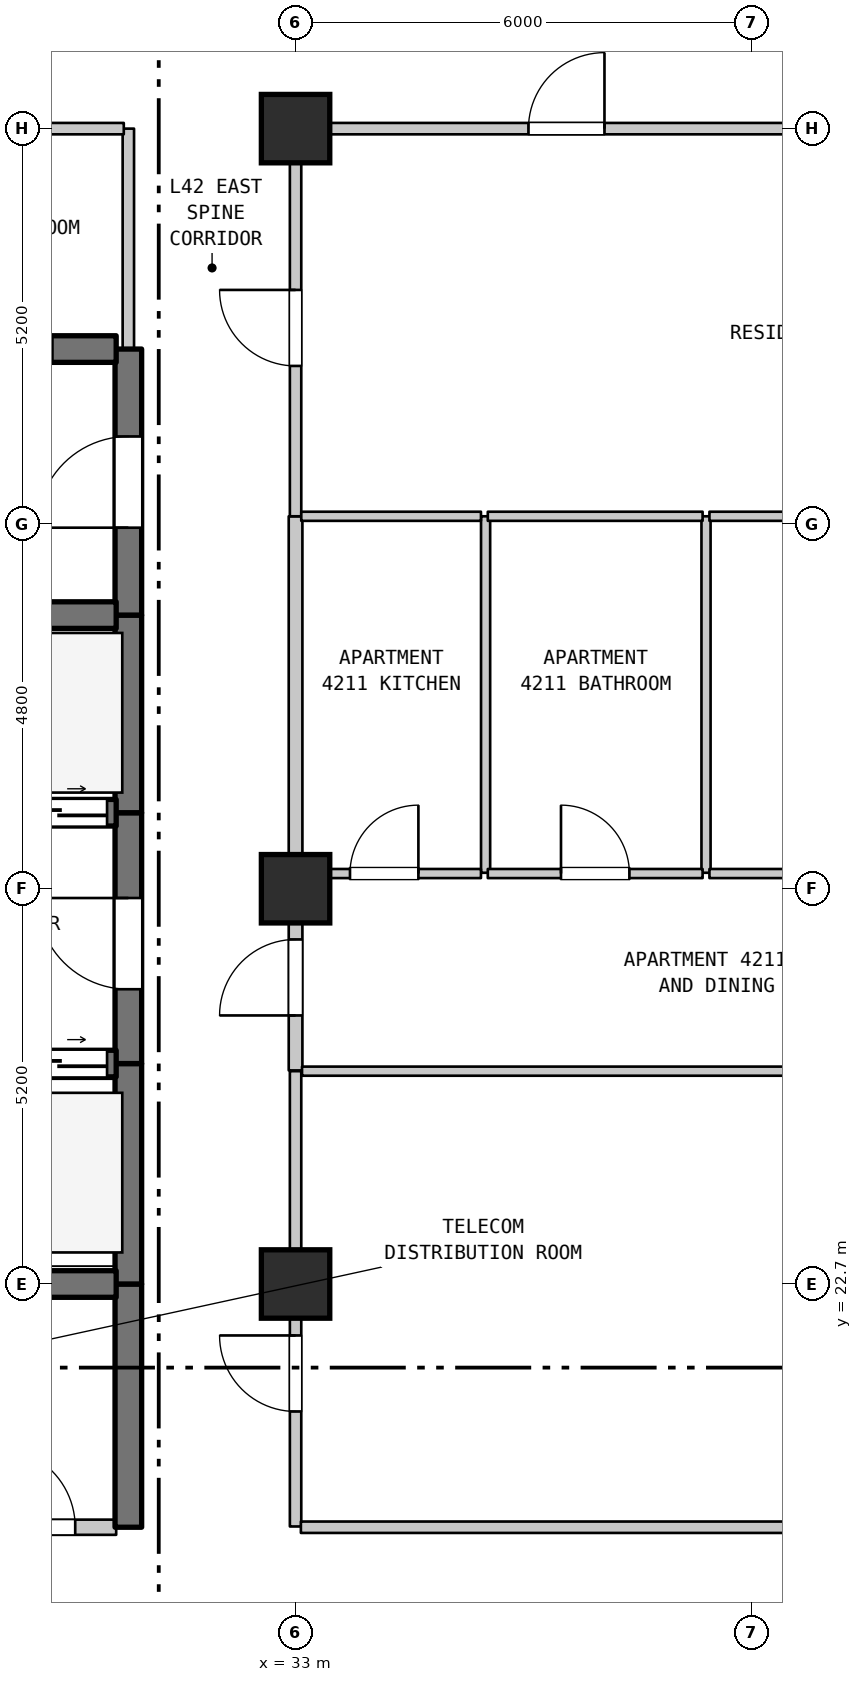
"""IFC4 building model, lengths in metres.
Left out: names, types, materials, properties, quantities, classifications, styles, units other than length and angle.
Written with IfcOpenShell. Run it as: python <this file> out.ifc"""

import sys

from ifc_helpers import new_model, si_unit, direction, frame, frame_2d, origin, origin_2d, place, context, subcontext, project, spatial, rectangle, extrude, element, fill, save


model = new_model("IFC4")
c1 = context("Model", 3, precision=1e-05, world=origin(), true_north=direction((0.0, 1.0)))
c2 = subcontext(c1, "Body", "Model", "MODEL_VIEW")
j1 = project(units=[si_unit("LENGTHUNIT", "METRE"), si_unit("PLANEANGLEUNIT", "RADIAN")], contexts=[c1])
p1 = place(None, origin())
s1 = spatial("IfcSite", under=j1, at=p1, CompositionType="ELEMENT")
p2 = place(p1, origin())
s2 = spatial("IfcBuilding", under=s1, at=p2, CompositionType="ELEMENT")
p3 = place(p2, frame((0.0, 0.0, 172.8)))
s3 = spatial("IfcBuildingStorey", under=s2, at=p3, CompositionType="ELEMENT", Elevation=172.8)
for number, where, z_axis, x_axis in (
    (1, (33.0, 22.7, 0.0), (0.0, 0.0, 1.0), (1.0, 0.0, 0.0)),
    (2, (33.0, 27.9, 0.0), (0.0, 0.0, 1.0), (1.0, 0.0, 0.0)),
    (3, (33.0, 37.9, 0.0), (0.0, 0.0, 1.0), (1.0, 0.0, 0.0)),
):
    element("IfcColumn", number, at=place(p3, frame(where, z_axis=z_axis, x_axis=x_axis)), inside=s3, PredefinedType="COLUMN", context=c2, shape_type="SweptSolid", body=[
        extrude(rectangle(XDim=0.9, YDim=0.9, at=origin_2d()), origin(), (0.0, 0.0, 1.0), 3.7),
    ])
p4 = place(p3, frame((30.8, 19.5, 0.0), z_axis=(0.0, 0.0, 1.0), x_axis=(0.0, 1.0, 0.0)))
e4 = element("IfcWall", 4, at=p4, inside=s3, PredefinedType="SHEAR", context=c2, shape_type="SweptSolid", body=[
    extrude(rectangle(XDim=3.2, YDim=0.35, at=frame_2d((1.6, 0.0))), origin(), (0.0, 0.0, 1.0), 3.39),
])
p5 = place(p3, frame((30.8, 22.7, 0.0), z_axis=(0.0, 0.0, 1.0), x_axis=(0.0, 1.0, 0.0)))
e5 = element("IfcWall", 5, at=p5, inside=s3, PredefinedType="SHEAR", context=c2, shape_type="SweptSolid", body=[
    extrude(rectangle(XDim=2.9, YDim=0.35, at=frame_2d((1.45, 0.0))), origin(), (0.0, 0.0, 1.0), 3.39),
])
p6 = place(p3, frame((30.8, 25.6, 0.0), z_axis=(0.0, 0.0, 1.0), x_axis=(0.0, 1.0, 0.0)))
e6 = element("IfcWall", 6, at=p6, inside=s3, PredefinedType="SHEAR", context=c2, shape_type="SweptSolid", body=[
    extrude(rectangle(XDim=3.3, YDim=0.35, at=frame_2d((1.65, 0.0))), origin(), (0.0, 0.0, 1.0), 3.39),
])
p7 = place(p6, frame((0.978, 0.0, 0.0)))
e7 = element("IfcOpeningElement", 7, at=p7, cuts=e6, PredefinedType="OPENING", context=c2, shape_type="SweptSolid", body=[
    extrude(rectangle(XDim=1.2, YDim=2.2, at=frame_2d((0.6, 1.1))), frame((0.0, 0.185, 0.0), z_axis=(0.0, -1.0, 0.0), x_axis=(1.0, 0.0, 0.0)), (0.0, 0.0, 1.0), 0.37),
])
p8 = place(p3, frame((30.8, 28.9, 0.0), z_axis=(0.0, 0.0, 1.0), x_axis=(0.0, 1.0, 0.0)))
e8 = element("IfcWall", 8, at=p8, inside=s3, PredefinedType="SHEAR", context=c2, shape_type="SweptSolid", body=[
    extrude(rectangle(XDim=2.6, YDim=0.35, at=frame_2d((1.3, 0.0))), origin(), (0.0, 0.0, 1.0), 3.39),
])
p9 = place(p3, frame((30.8, 31.5, 0.0), z_axis=(0.0, 0.0, 1.0), x_axis=(0.0, 1.0, 0.0)))
e9 = element("IfcWall", 9, at=p9, inside=s3, PredefinedType="SHEAR", context=c2, shape_type="SweptSolid", body=[
    extrude(rectangle(XDim=3.5, YDim=0.35, at=frame_2d((1.75, 0.0))), origin(), (0.0, 0.0, 1.0), 3.39),
])
p10 = place(p9, frame((1.15, 0.0, 0.0)))
e10 = element("IfcOpeningElement", 10, at=p10, cuts=e9, PredefinedType="OPENING", context=c2, shape_type="SweptSolid", body=[
    extrude(rectangle(XDim=1.2, YDim=2.2, at=frame_2d((0.6, 1.1))), frame((0.0, 0.185, 0.0), z_axis=(0.0, -1.0, 0.0), x_axis=(1.0, 0.0, 0.0)), (0.0, 0.0, 1.0), 0.37),
])
p11 = place(p3, frame((30.8, 35.0, 0.0), z_axis=(0.0, 0.0, 1.0), x_axis=(0.0, 1.0, 0.0)))
e11 = element("IfcWall", 11, at=p11, inside=s3, PredefinedType="STANDARD", context=c2, shape_type="SweptSolid", body=[
    extrude(rectangle(XDim=2.9, YDim=0.15, at=frame_2d((1.45, 0.0))), origin(), (0.0, 0.0, 1.0), 3.39),
])
p12 = place(p3, frame((33.0, 19.51, 0.0), z_axis=(0.0, 0.0, 1.0), x_axis=(0.0, 1.0, 0.0)))
e12 = element("IfcWall", 12, at=p12, inside=s3, PredefinedType="STANDARD", context=c2, shape_type="SweptSolid", body=[
    extrude(rectangle(XDim=5.99, YDim=0.15, at=frame_2d((2.995, 0.0))), origin(), (0.0, 0.0, 1.0), 2.99),
])
p13 = place(p12, frame((1.513, 0.0, 0.0)))
e13 = element("IfcOpeningElement", 13, at=p13, cuts=e12, PredefinedType="OPENING", context=c2, shape_type="SweptSolid", body=[
    extrude(rectangle(XDim=1.0, YDim=2.15, at=frame_2d((0.5, 1.075))), frame((0.0, 0.085, 0.0), z_axis=(0.0, -1.0, 0.0), x_axis=(1.0, 0.0, 0.0)), (0.0, 0.0, 1.0), 0.17),
])
p14 = place(p3, frame((33.0, 25.51, 0.0), z_axis=(0.0, 0.0, 1.0), x_axis=(0.0, 1.0, 0.0)))
e14 = element("IfcWall", 14, at=p14, inside=s3, PredefinedType="STANDARD", context=c2, shape_type="SweptSolid", body=[
    extrude(rectangle(XDim=2.6, YDim=0.18, at=frame_2d((1.3, 0.0))), origin(), (0.0, 0.0, 1.0), 2.99),
])
p15 = place(p14, frame((0.723, 0.0, 0.0)))
e15 = element("IfcOpeningElement", 15, at=p15, cuts=e14, PredefinedType="OPENING", context=c2, shape_type="SweptSolid", body=[
    extrude(rectangle(XDim=1.0, YDim=2.15, at=frame_2d((0.5, 1.075))), frame((0.0, 0.1, 0.0), z_axis=(0.0, -1.0, 0.0), x_axis=(1.0, 0.0, 0.0)), (0.0, 0.0, 1.0), 0.2),
])
p16 = place(p3, frame((33.0, 28.11, 0.0), z_axis=(0.0, 0.0, 1.0), x_axis=(0.0, 1.0, 0.0)))
e16 = element("IfcWall", 16, at=p16, inside=s3, PredefinedType="STANDARD", context=c2, shape_type="SweptSolid", body=[
    extrude(rectangle(XDim=4.69, YDim=0.18, at=frame_2d((2.345, 0.0))), origin(), (0.0, 0.0, 1.0), 2.89),
])
p17 = place(p3, frame((33.0, 32.8, 0.0), z_axis=(0.0, 0.0, 1.0), x_axis=(0.0, 1.0, 0.0)))
e17 = element("IfcWall", 17, at=p17, inside=s3, PredefinedType="STANDARD", context=c2, shape_type="SweptSolid", body=[
    extrude(rectangle(XDim=5.1, YDim=0.15, at=frame_2d((2.55, 0.0))), origin(), (0.0, 0.0, 1.0), 2.89),
])
p18 = place(p17, frame((1.978, 0.0, 0.0)))
e18 = element("IfcOpeningElement", 18, at=p18, cuts=e17, PredefinedType="OPENING", context=c2, shape_type="SweptSolid", body=[
    extrude(rectangle(XDim=1.0, YDim=2.15, at=frame_2d((0.5, 1.075))), frame((0.0, 0.085, 0.0), z_axis=(0.0, -1.0, 0.0), x_axis=(1.0, 0.0, 0.0)), (0.0, 0.0, 1.0), 0.17),
])
for number, where, z_axis, x_axis in (
    (19, (35.5, 28.11, 0.0), (0.0, 0.0, 1.0), (0.0, 1.0, 0.0)),
    (20, (38.4, 28.11, 0.0), (0.0, 0.0, 1.0), (0.0, 1.0, 0.0)),
):
    element("IfcWall", number, at=place(p3, frame(where, z_axis=z_axis, x_axis=x_axis)), inside=s3, PredefinedType="PARTITIONING", context=c2, shape_type="SweptSolid", body=[
        extrude(rectangle(XDim=4.69, YDim=0.12, at=frame_2d((2.345, 0.0))), origin(), (0.0, 0.0, 1.0), 3.39),
    ])
p19 = place(p3, frame((28.585, 19.5, 0.0), z_axis=(0.0, 0.0, 1.0), x_axis=(1.0, 0.0, 0.0)))
e21 = element("IfcWall", 21, at=p19, inside=s3, PredefinedType="STANDARD", context=c2, shape_type="SweptSolid", body=[
    extrude(rectangle(XDim=2.055, YDim=0.2, at=frame_2d((1.027, 0.0))), origin(), (0.0, 0.0, 1.0), 3.39),
])
p20 = place(p19, frame((0.466, 0.0, 0.0)))
e22 = element("IfcOpeningElement", 22, at=p20, cuts=e21, PredefinedType="OPENING", context=c2, shape_type="SweptSolid", body=[
    extrude(rectangle(XDim=1.05, YDim=2.15, at=frame_2d((0.525, 1.075))), frame((0.0, 0.11, 0.0), z_axis=(0.0, -1.0, 0.0), x_axis=(1.0, 0.0, 0.0)), (0.0, 0.0, 1.0), 0.22),
])
p21 = place(p3, frame((33.07, 19.5, 0.0), z_axis=(0.0, 0.0, 1.0), x_axis=(1.0, 0.0, 0.0)))
e23 = element("IfcWall", 23, at=p21, inside=s3, PredefinedType="STANDARD", context=c2, shape_type="SweptSolid", body=[
    extrude(rectangle(XDim=21.51, YDim=0.15, at=frame_2d((10.755, 0.0))), origin(), (0.0, 0.0, 1.0), 3.39),
])
p22 = place(p21, frame((10.185, 0.0, 0.0)))
e24 = element("IfcOpeningElement", 24, at=p22, cuts=e23, PredefinedType="OPENING", context=c2, shape_type="SweptSolid", body=[
    extrude(rectangle(XDim=1.0, YDim=2.15, at=frame_2d((0.5, 1.075))), frame((0.0, 0.085, 0.0), z_axis=(0.0, -1.0, 0.0), x_axis=(1.0, 0.0, 0.0)), (0.0, 0.0, 1.0), 0.17),
])
p23 = place(p3, frame((28.585, 22.7, 0.0), z_axis=(0.0, 0.0, 1.0), x_axis=(1.0, 0.0, 0.0)))
e25 = element("IfcWall", 25, at=p23, inside=s3, PredefinedType="SHEAR", context=c2, shape_type="SweptSolid", body=[
    extrude(rectangle(XDim=2.055, YDim=0.35, at=frame_2d((1.027, 0.0))), origin(), (0.0, 0.0, 1.0), 3.39),
])
p24 = place(p3, frame((33.085, 25.5, 0.0), z_axis=(0.0, 0.0, 1.0), x_axis=(1.0, 0.0, 0.0)))
e26 = element("IfcWall", 26, at=p24, inside=s3, PredefinedType="PARTITIONING", context=c2, shape_type="SweptSolid", body=[
    extrude(rectangle(XDim=23.905, YDim=0.12, at=frame_2d((11.953, 0.0))), origin(), (0.0, 0.0, 1.0), 3.39),
])
p25 = place(p3, frame((27.46, 25.6, 0.0), z_axis=(0.0, 0.0, 1.0), x_axis=(1.0, 0.0, 0.0)))
e27 = element("IfcWall", 27, at=p25, inside=s3, PredefinedType="SHEAR", context=c2, shape_type="SweptSolid", body=[
    extrude(rectangle(XDim=3.18, YDim=0.35, at=frame_2d((1.59, 0.0))), origin(), (0.0, 0.0, 1.0), 3.39),
])
p26 = place(p25, frame((0.12, 0.0, 0.0)))
e28 = element("IfcOpeningElement", 28, at=p26, cuts=e27, PredefinedType="OPENING", context=c2, shape_type="SweptSolid", body=[
    extrude(rectangle(XDim=1.25, YDim=2.2, at=frame_2d((0.625, 1.1))), frame((0.0, 0.185, 0.0), z_axis=(0.0, -1.0, 0.0), x_axis=(1.0, 0.0, 0.0)), (0.0, 0.0, 1.0), 0.37),
])
p27 = place(p25, frame((1.81, 0.0, 0.0)))
e29 = element("IfcOpeningElement", 29, at=p27, cuts=e27, PredefinedType="OPENING", context=c2, shape_type="SweptSolid", body=[
    extrude(rectangle(XDim=1.25, YDim=2.2, at=frame_2d((0.625, 1.1))), frame((0.0, 0.185, 0.0), z_axis=(0.0, -1.0, 0.0), x_axis=(1.0, 0.0, 0.0)), (0.0, 0.0, 1.0), 0.37),
])
p28 = place(p3, frame((33.075, 28.1, 0.0), z_axis=(0.0, 0.0, 1.0), x_axis=(1.0, 0.0, 0.0)))
e30 = element("IfcWall", 30, at=p28, inside=s3, PredefinedType="PARTITIONING", context=c2, shape_type="SweptSolid", body=[
    extrude(rectangle(XDim=2.364, YDim=0.12, at=frame_2d((1.182, 0.0))), origin(), (0.0, 0.0, 1.0), 3.39),
])
p29 = place(p28, frame((0.641, 0.0, 0.0)))
e31 = element("IfcOpeningElement", 31, at=p29, cuts=e30, PredefinedType="OPENING", context=c2, shape_type="SweptSolid", body=[
    extrude(rectangle(XDim=0.9, YDim=2.15, at=frame_2d((0.45, 1.075))), frame((0.0, 0.07, 0.0), z_axis=(0.0, -1.0, 0.0), x_axis=(1.0, 0.0, 0.0)), (0.0, 0.0, 1.0), 0.14),
])
p30 = place(p3, frame((35.529, 28.1, 0.0), z_axis=(0.0, 0.0, 1.0), x_axis=(1.0, 0.0, 0.0)))
e32 = element("IfcWall", 32, at=p30, inside=s3, PredefinedType="PARTITIONING", context=c2, shape_type="SweptSolid", body=[
    extrude(rectangle(XDim=2.826, YDim=0.12, at=frame_2d((1.413, 0.0))), origin(), (0.0, 0.0, 1.0), 3.39),
])
p31 = place(p30, frame((0.963, 0.0, 0.0)))
e33 = element("IfcOpeningElement", 33, at=p31, cuts=e32, PredefinedType="OPENING", context=c2, shape_type="SweptSolid", body=[
    extrude(rectangle(XDim=0.9, YDim=2.1, at=frame_2d((0.45, 1.05))), frame((0.0, 0.07, 0.0), z_axis=(0.0, -1.0, 0.0), x_axis=(1.0, 0.0, 0.0)), (0.0, 0.0, 1.0), 0.14),
])
p32 = place(p3, frame((38.445, 28.1, 0.0), z_axis=(0.0, 0.0, 1.0), x_axis=(1.0, 0.0, 0.0)))
e34 = element("IfcWall", 34, at=p32, inside=s3, PredefinedType="PARTITIONING", context=c2, shape_type="SweptSolid", body=[
    extrude(rectangle(XDim=6.499, YDim=0.12, at=frame_2d((3.25, 0.0))), origin(), (0.0, 0.0, 1.0), 3.39),
])
p33 = place(p32, frame((2.774, 0.0, 0.0)))
e35 = element("IfcOpeningElement", 35, at=p33, cuts=e34, PredefinedType="OPENING", context=c2, shape_type="SweptSolid", body=[
    extrude(rectangle(XDim=0.9, YDim=2.15, at=frame_2d((0.45, 1.075))), frame((0.0, 0.07, 0.0), z_axis=(0.0, -1.0, 0.0), x_axis=(1.0, 0.0, 0.0)), (0.0, 0.0, 1.0), 0.14),
])
p34 = place(p3, frame((27.46, 28.9, 0.0), z_axis=(0.0, 0.0, 1.0), x_axis=(1.0, 0.0, 0.0)))
e36 = element("IfcWall", 36, at=p34, inside=s3, PredefinedType="SHEAR", context=c2, shape_type="SweptSolid", body=[
    extrude(rectangle(XDim=3.18, YDim=0.35, at=frame_2d((1.59, 0.0))), origin(), (0.0, 0.0, 1.0), 3.39),
])
p35 = place(p34, frame((0.12, 0.0, 0.0)))
e37 = element("IfcOpeningElement", 37, at=p35, cuts=e36, PredefinedType="OPENING", context=c2, shape_type="SweptSolid", body=[
    extrude(rectangle(XDim=1.25, YDim=2.2, at=frame_2d((0.625, 1.1))), frame((0.0, 0.185, 0.0), z_axis=(0.0, -1.0, 0.0), x_axis=(1.0, 0.0, 0.0)), (0.0, 0.0, 1.0), 0.37),
])
p36 = place(p34, frame((1.81, 0.0, 0.0)))
e38 = element("IfcOpeningElement", 38, at=p36, cuts=e36, PredefinedType="OPENING", context=c2, shape_type="SweptSolid", body=[
    extrude(rectangle(XDim=1.25, YDim=2.2, at=frame_2d((0.625, 1.1))), frame((0.0, 0.185, 0.0), z_axis=(0.0, -1.0, 0.0), x_axis=(1.0, 0.0, 0.0)), (0.0, 0.0, 1.0), 0.37),
])
p37 = place(p3, frame((27.46, 31.5, 0.0), z_axis=(0.0, 0.0, 1.0), x_axis=(1.0, 0.0, 0.0)))
e39 = element("IfcWall", 39, at=p37, inside=s3, PredefinedType="SHEAR", context=c2, shape_type="SweptSolid", body=[
    extrude(rectangle(XDim=3.18, YDim=0.35, at=frame_2d((1.59, 0.0))), origin(), (0.0, 0.0, 1.0), 3.39),
])
p38 = place(p3, frame((33.075, 32.8, 0.0), z_axis=(0.0, 0.0, 1.0), x_axis=(1.0, 0.0, 0.0)))
e40 = element("IfcWall", 40, at=p38, inside=s3, PredefinedType="PARTITIONING", context=c2, shape_type="SweptSolid", body=[
    extrude(rectangle(XDim=2.364, YDim=0.12, at=frame_2d((1.182, 0.0))), origin(), (0.0, 0.0, 1.0), 3.39),
])
p39 = place(p3, frame((35.529, 32.8, 0.0), z_axis=(0.0, 0.0, 1.0), x_axis=(1.0, 0.0, 0.0)))
e41 = element("IfcWall", 41, at=p39, inside=s3, PredefinedType="PARTITIONING", context=c2, shape_type="SweptSolid", body=[
    extrude(rectangle(XDim=2.826, YDim=0.12, at=frame_2d((1.413, 0.0))), origin(), (0.0, 0.0, 1.0), 3.39),
])
p40 = place(p3, frame((38.445, 32.8, 0.0), z_axis=(0.0, 0.0, 1.0), x_axis=(1.0, 0.0, 0.0)))
e42 = element("IfcWall", 42, at=p40, inside=s3, PredefinedType="PARTITIONING", context=c2, shape_type="SweptSolid", body=[
    extrude(rectangle(XDim=5.414, YDim=0.12, at=frame_2d((2.707, 0.0))), origin(), (0.0, 0.0, 1.0), 3.39),
])
p41 = place(p3, frame((28.045, 35.0, 0.0), z_axis=(0.0, 0.0, 1.0), x_axis=(1.0, 0.0, 0.0)))
e43 = element("IfcWall", 43, at=p41, inside=s3, PredefinedType="SHEAR", context=c2, shape_type="SweptSolid", body=[
    extrude(rectangle(XDim=2.595, YDim=0.35, at=frame_2d((1.297, 0.0))), origin(), (0.0, 0.0, 1.0), 3.39),
])
p42 = place(p41, frame((0.806, 0.0, 0.0)))
e44 = element("IfcOpeningElement", 44, at=p42, cuts=e43, PredefinedType="OPENING", context=c2, shape_type="SweptSolid", body=[
    extrude(rectangle(XDim=0.95, YDim=2.15, at=frame_2d((0.475, 1.075))), frame((0.0, 0.185, 0.0), z_axis=(0.0, -1.0, 0.0), x_axis=(1.0, 0.0, 0.0)), (0.0, 0.0, 1.0), 0.37),
])
p43 = place(p3, frame((28.045, 37.9, 0.0), z_axis=(0.0, 0.0, 1.0), x_axis=(1.0, 0.0, 0.0)))
e45 = element("IfcWall", 45, at=p43, inside=s3, PredefinedType="STANDARD", context=c2, shape_type="SweptSolid", body=[
    extrude(rectangle(XDim=2.695, YDim=0.15, at=frame_2d((1.348, 0.0))), origin(), (0.0, 0.0, 1.0), 2.89),
])
p44 = place(p3, frame((33.06, 37.9, 0.0), z_axis=(0.0, 0.0, 1.0), x_axis=(1.0, 0.0, 0.0)))
e46 = element("IfcWall", 46, at=p44, inside=s3, PredefinedType="STANDARD", context=c2, shape_type="SweptSolid", body=[
    extrude(rectangle(XDim=7.164, YDim=0.15, at=frame_2d((3.582, 0.0))), origin(), (0.0, 0.0, 1.0), 3.39),
])
p45 = place(p44, frame((3.004, 0.0, 0.0)))
e47 = element("IfcOpeningElement", 47, at=p45, cuts=e46, PredefinedType="OPENING", context=c2, shape_type="SweptSolid", body=[
    extrude(rectangle(XDim=1.0, YDim=2.15, at=frame_2d((0.5, 1.075))), frame((0.0, 0.085, 0.0), z_axis=(0.0, -1.0, 0.0), x_axis=(1.0, 0.0, 0.0)), (0.0, 0.0, 1.0), 0.17),
])
p46 = place(p7, origin())
e48 = element("IfcDoor", 48, at=p46, inside=s3, OperationType="SINGLE_SWING_RIGHT", PredefinedType="DOOR", context=c2, shape_type="SweptSolid", body=[
    extrude(rectangle(XDim=1.2, YDim=2.2, at=frame_2d((0.6, 1.1))), frame((0.0, 0.025, 0.0), z_axis=(0.0, -1.0, 0.0), x_axis=(1.0, 0.0, 0.0)), (0.0, 0.0, 1.0), 0.05),
])
fill(e7, e48)
p47 = place(p10, origin())
e49 = element("IfcDoor", 49, at=p47, inside=s3, OperationType="SINGLE_SWING_LEFT", PredefinedType="DOOR", context=c2, shape_type="SweptSolid", body=[
    extrude(rectangle(XDim=1.2, YDim=2.2, at=frame_2d((0.6, 1.1))), frame((0.0, 0.025, 0.0), z_axis=(0.0, -1.0, 0.0), x_axis=(1.0, 0.0, 0.0)), (0.0, 0.0, 1.0), 0.05),
])
fill(e10, e49)
p48 = place(p13, origin())
e50 = element("IfcDoor", 50, at=p48, inside=s3, OperationType="SINGLE_SWING_RIGHT", PredefinedType="DOOR", context=c2, shape_type="SweptSolid", body=[
    extrude(rectangle(XDim=1.0, YDim=2.15, at=frame_2d((0.5, 1.075))), frame((0.0, 0.025, 0.0), z_axis=(0.0, -1.0, 0.0), x_axis=(1.0, 0.0, 0.0)), (0.0, 0.0, 1.0), 0.05),
])
fill(e13, e50)
p49 = place(p15, origin())
e51 = element("IfcDoor", 51, at=p49, inside=s3, OperationType="SINGLE_SWING_LEFT", PredefinedType="DOOR", context=c2, shape_type="SweptSolid", body=[
    extrude(rectangle(XDim=1.0, YDim=2.15, at=frame_2d((0.5, 1.075))), frame((0.0, 0.025, 0.0), z_axis=(0.0, -1.0, 0.0), x_axis=(1.0, 0.0, 0.0)), (0.0, 0.0, 1.0), 0.05),
])
fill(e15, e51)
p50 = place(p18, origin())
e52 = element("IfcDoor", 52, at=p50, inside=s3, OperationType="SINGLE_SWING_RIGHT", PredefinedType="DOOR", context=c2, shape_type="SweptSolid", body=[
    extrude(rectangle(XDim=1.0, YDim=2.15, at=frame_2d((0.5, 1.075))), frame((0.0, 0.025, 0.0), z_axis=(0.0, -1.0, 0.0), x_axis=(1.0, 0.0, 0.0)), (0.0, 0.0, 1.0), 0.05),
])
fill(e18, e52)
p51 = place(p20, origin())
e53 = element("IfcDoor", 53, at=p51, inside=s3, OperationType="SINGLE_SWING_LEFT", PredefinedType="DOOR", context=c2, shape_type="SweptSolid", body=[
    extrude(rectangle(XDim=1.05, YDim=2.15, at=frame_2d((0.525, 1.075))), frame((0.0, 0.025, 0.0), z_axis=(0.0, -1.0, 0.0), x_axis=(1.0, 0.0, 0.0)), (0.0, 0.0, 1.0), 0.05),
])
fill(e22, e53)
p52 = place(p27, origin())
e54 = element("IfcDoor", 54, at=p52, inside=s3, OperationType="DOUBLE_DOOR_SLIDING", PredefinedType="DOOR", context=c2, shape_type="SweptSolid", body=[
    extrude(rectangle(XDim=1.25, YDim=2.2, at=frame_2d((0.625, 1.1))), frame((0.0, 0.025, 0.0), z_axis=(0.0, -1.0, 0.0), x_axis=(1.0, 0.0, 0.0)), (0.0, 0.0, 1.0), 0.05),
])
fill(e29, e54)
p53 = place(p29, origin())
e55 = element("IfcDoor", 55, at=p53, inside=s3, OperationType="SINGLE_SWING_RIGHT", PredefinedType="DOOR", context=c2, shape_type="SweptSolid", body=[
    extrude(rectangle(XDim=0.9, YDim=2.15, at=frame_2d((0.45, 1.075))), frame((0.0, 0.025, 0.0), z_axis=(0.0, -1.0, 0.0), x_axis=(1.0, 0.0, 0.0)), (0.0, 0.0, 1.0), 0.05),
])
fill(e31, e55)
p54 = place(p31, origin())
e56 = element("IfcDoor", 56, at=p54, inside=s3, OperationType="SINGLE_SWING_LEFT", PredefinedType="DOOR", context=c2, shape_type="SweptSolid", body=[
    extrude(rectangle(XDim=0.9, YDim=2.1, at=frame_2d((0.45, 1.05))), frame((0.0, 0.025, 0.0), z_axis=(0.0, -1.0, 0.0), x_axis=(1.0, 0.0, 0.0)), (0.0, 0.0, 1.0), 0.05),
])
fill(e33, e56)
p55 = place(p36, origin())
e57 = element("IfcDoor", 57, at=p55, inside=s3, OperationType="DOUBLE_DOOR_SLIDING", PredefinedType="DOOR", context=c2, shape_type="SweptSolid", body=[
    extrude(rectangle(XDim=1.25, YDim=2.2, at=frame_2d((0.625, 1.1))), frame((0.0, 0.025, 0.0), z_axis=(0.0, -1.0, 0.0), x_axis=(1.0, 0.0, 0.0)), (0.0, 0.0, 1.0), 0.05),
])
fill(e38, e57)
p56 = place(p42, frame((0.95, 0.0, 0.0), z_axis=(0.0, 0.0, 1.0), x_axis=(-1.0, 0.0, 0.0)))
e58 = element("IfcDoor", 58, at=p56, inside=s3, OperationType="SINGLE_SWING_LEFT", PredefinedType="DOOR", context=c2, shape_type="SweptSolid", body=[
    extrude(rectangle(XDim=0.95, YDim=2.15, at=frame_2d((0.475, 1.075))), frame((0.0, 0.025, 0.0), z_axis=(0.0, -1.0, 0.0), x_axis=(1.0, 0.0, 0.0)), (0.0, 0.0, 1.0), 0.05),
])
fill(e44, e58)
p57 = place(p45, origin())
e59 = element("IfcDoor", 59, at=p57, inside=s3, OperationType="SINGLE_SWING_RIGHT", PredefinedType="DOOR", context=c2, shape_type="SweptSolid", body=[
    extrude(rectangle(XDim=1.0, YDim=2.15, at=frame_2d((0.5, 1.075))), frame((0.0, 0.025, 0.0), z_axis=(0.0, -1.0, 0.0), x_axis=(1.0, 0.0, 0.0)), (0.0, 0.0, 1.0), 0.05),
])
fill(e47, e59)
save(model, sys.argv[1])
